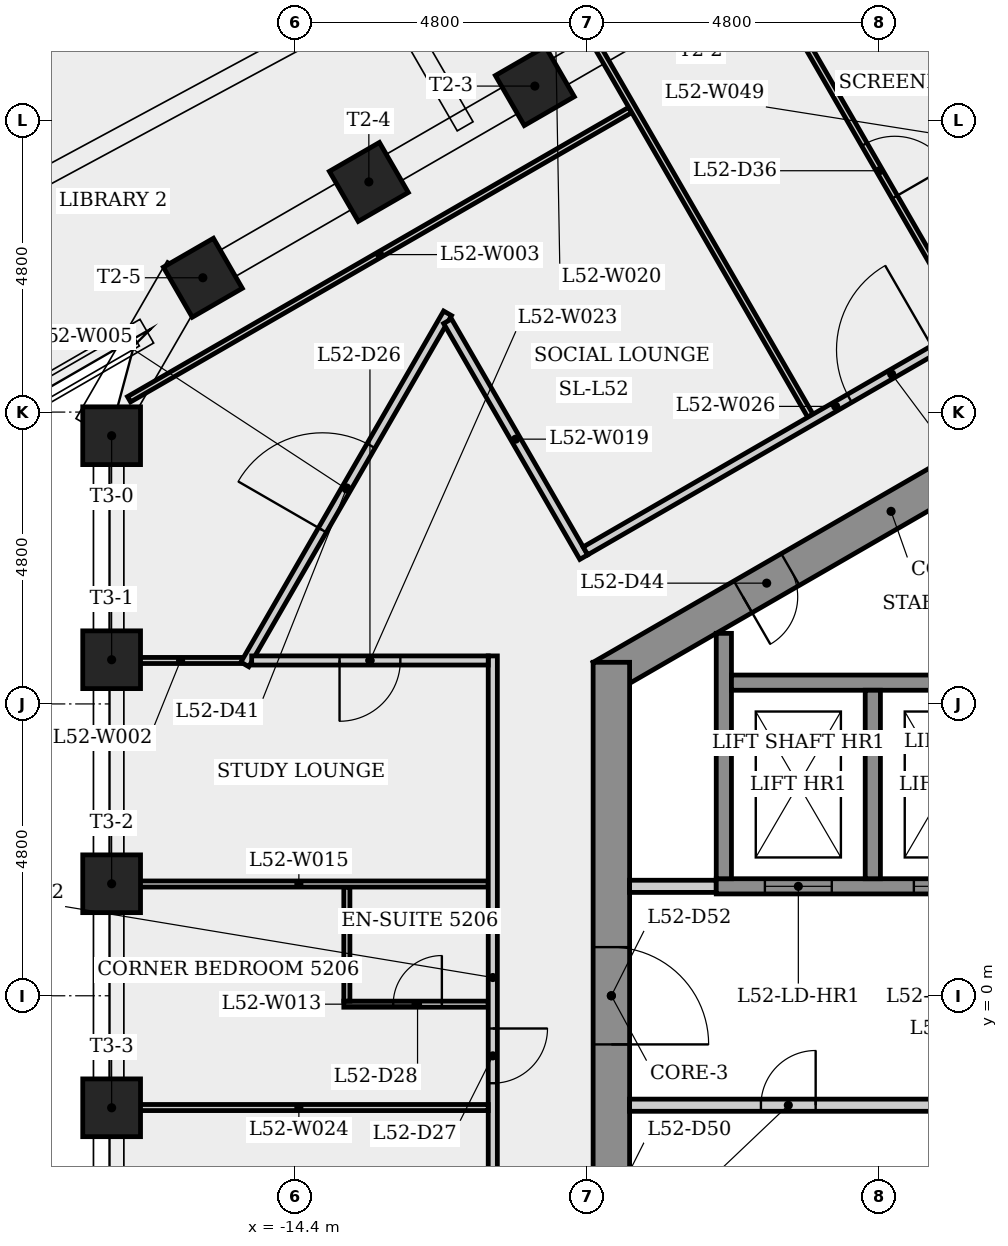
"""IFC4 building model, lengths in metres.
Left out: names, types, materials, properties, quantities, classifications, styles, units other than length and angle.
Written with IfcOpenShell. Run it as: python <this file> out.ifc"""

import sys

from ifc_helpers import new_model, si_unit, direction, frame, frame_2d, origin, origin_2d, place, context, subcontext, project, spatial, rectangle, extrude, element, fill, save


model = new_model("IFC4")
c1 = context("Model", 3, precision=1e-05, world=origin(), true_north=direction((0.0, 1.0)))
c2 = subcontext(c1, "Body", "Model", "MODEL_VIEW")
j1 = project(units=[si_unit("LENGTHUNIT", "METRE"), si_unit("PLANEANGLEUNIT", "RADIAN")], contexts=[c1])
p1 = place(None, origin())
s1 = spatial("IfcSite", under=j1, at=p1, CompositionType="ELEMENT")
p2 = place(p1, origin())
s2 = spatial("IfcBuilding", under=s1, at=p2, CompositionType="ELEMENT")
p3 = place(p2, frame((0.0, 0.0, 194.7)))
s3 = spatial("IfcBuildingStorey", under=s2, at=p3, CompositionType="ELEMENT", Elevation=194.7)
p4 = place(p3, frame((0.15, 10.71, 0.0), z_axis=(0.0, 0.0, 1.0), x_axis=(-0.866023993627, -0.500002442456, 0.0)))
e1 = element("IfcWall", 1, at=p4, inside=s3, PredefinedType="SHEAR", context=c2, shape_type="SweptSolid", body=[
    extrude(rectangle(XDim=10.97, YDim=0.6, at=frame_2d((5.485, 0.0))), origin(), (0.0, 0.0, 1.0), 4.0),
])
p5 = place(p4, frame((7.397, 0.0, 0.0)))
e2 = element("IfcOpeningElement", 2, at=p5, cuts=e1, PredefinedType="OPENING", context=c2, shape_type="SweptSolid", body=[
    extrude(rectangle(XDim=0.9, YDim=2.1, at=frame_2d((0.45, 1.05))), frame((0.0, 0.31, 0.0), z_axis=(0.0, -1.0, 0.0), x_axis=(1.0, 0.0, 0.0)), (0.0, 0.0, 1.0), 0.62),
])
p6 = place(p3, frame((-9.2, 5.485, 0.0), z_axis=(0.0, 0.0, 1.0), x_axis=(0.0, -1.0, 0.0)))
e3 = element("IfcWall", 3, at=p6, inside=s3, PredefinedType="SHEAR", context=c2, shape_type="SweptSolid", body=[
    extrude(rectangle(XDim=10.97, YDim=0.6, at=frame_2d((5.485, 0.0))), origin(), (0.0, 0.0, 1.0), 4.0),
])
p7 = place(p6, frame((8.516, 0.0, 0.0)))
e4 = element("IfcOpeningElement", 4, at=p7, cuts=e3, PredefinedType="OPENING", context=c2, shape_type="SweptSolid", body=[
    extrude(rectangle(XDim=0.9, YDim=2.1, at=frame_2d((0.45, 1.05))), frame((0.0, 0.31, 0.0), z_axis=(0.0, -1.0, 0.0), x_axis=(1.0, 0.0, 0.0)), (0.0, 0.0, 1.0), 0.62),
])
p8 = place(p6, frame((4.685, 0.0, 0.0)))
e5 = element("IfcOpeningElement", 5, at=p8, cuts=e3, PredefinedType="OPENING", context=c2, shape_type="SweptSolid", body=[
    extrude(rectangle(XDim=1.6, YDim=2.1, at=frame_2d((0.8, 1.05))), frame((0.0, 0.31, 0.0), z_axis=(0.0, -1.0, 0.0), x_axis=(1.0, 0.0, 0.0)), (0.0, 0.0, 1.0), 0.62),
])
for number, where, z_axis, x_axis in (
    (6, (-10.458, 14.962, 0.0), (0.0, 0.0, 1.0), (-0.5, 0.866, 0.0)),
    (7, (-13.188, 13.386, 0.0), (0.0, 0.0, 1.0), (-0.5, 0.866, 0.0)),
    (8, (-15.918, 11.809, 0.0), (0.0, 0.0, 1.0), (-0.5, 0.866, 0.0)),
    (9, (-17.418, 9.211, 0.0), (0.0, 0.0, 1.0), (-1.0, 0.0, 0.0)),
    (10, (-17.418, 5.527, 0.0), (0.0, 0.0, 1.0), (-1.0, 0.0, 0.0)),
    (11, (-17.418, 1.842, 0.0), (0.0, 0.0, 1.0), (-1.0, 0.0, 0.0)),
    (12, (-17.418, -1.842, 0.0), (0.0, 0.0, 1.0), (-1.0, 0.0, 0.0)),
):
    element("IfcColumn", number, at=place(p3, frame(where, z_axis=z_axis, x_axis=x_axis)), inside=s3, PredefinedType="COLUMN", context=c2, shape_type="SweptSolid", body=[
        extrude(rectangle(XDim=0.95, YDim=0.95, at=origin_2d()), origin(), (0.0, 0.0, 1.0), 4.0),
    ])
p9 = place(p3, frame((-26.639, 11.149, 0.0), z_axis=(0.0, 0.0, 1.0), x_axis=(0.866027084608, 0.499997088717, 0.0)))
e13 = element("IfcWall", 13, at=p9, inside=s3, PredefinedType="PARTITIONING", context=c2, shape_type="SweptSolid", body=[
    extrude(rectangle(XDim=17.083, YDim=0.1, at=frame_2d((8.542, 0.0))), origin(), (0.0, 0.0, 1.0), 3.65),
])
p10 = place(p3, frame((-17.303, 5.515, 0.0), z_axis=(0.0, 0.0, 1.0), x_axis=(1.0, 0.0, 0.0)))
e14 = element("IfcWall", 14, at=p10, inside=s3, PredefinedType="PARTITIONING", context=c2, shape_type="SweptSolid", body=[
    extrude(rectangle(XDim=2.038, YDim=0.1, at=frame_2d((1.019, 0.0))), origin(), (0.0, 0.0, 1.0), 3.65),
])
p11 = place(p3, frame((-17.132, 9.811, 0.0), z_axis=(0.0, 0.0, 1.0), x_axis=(0.866021566356, 0.500006646563, 0.0)))
e15 = element("IfcWall", 15, at=p11, inside=s3, PredefinedType="PARTITIONING", context=c2, shape_type="SweptSolid", body=[
    extrude(rectangle(XDim=9.518, YDim=0.1, at=frame_2d((4.759, 0.0))), origin(), (0.0, 0.0, 1.0), 3.65),
])
p12 = place(p3, frame((-15.228, 5.45, 0.0), z_axis=(0.0, 0.0, 1.0), x_axis=(0.499982336103, 0.8660356018, 0.0)))
e16 = element("IfcWall", 16, at=p12, inside=s3, PredefinedType="PARTITIONING", context=c2, shape_type="SweptSolid", body=[
    extrude(rectangle(XDim=6.668, YDim=0.15, at=frame_2d((3.334, 0.0))), origin(), (0.0, 0.0, 1.0), 3.65),
])
p13 = place(p12, frame((2.552, 0.0, 0.0)))
e17 = element("IfcOpeningElement", 17, at=p13, cuts=e16, PredefinedType="OPENING", context=c2, shape_type="SweptSolid", body=[
    extrude(rectangle(XDim=1.6, YDim=2.1, at=frame_2d((0.8, 1.05))), frame((0.0, 0.085, 0.0), z_axis=(0.0, -1.0, 0.0), x_axis=(1.0, 0.0, 0.0)), (0.0, 0.0, 1.0), 0.17),
])
p14 = place(p3, frame((-14.708, 30.748, 0.0), z_axis=(0.0, 0.0, 1.0), x_axis=(0.499993923875, -0.866028911808, 0.0)))
e18 = element("IfcWall", 18, at=p14, inside=s3, PredefinedType="PARTITIONING", context=c2, shape_type="SweptSolid", body=[
    extrude(rectangle(XDim=22.758, YDim=0.1, at=frame_2d((11.379, 0.0))), origin(), (0.0, 0.0, 1.0), 3.65),
])
p15 = place(p14, frame((1.731, 0.0, 0.0)))
e19 = element("IfcOpeningElement", 19, at=p15, cuts=e18, PredefinedType="OPENING", context=c2, shape_type="SweptSolid", body=[
    extrude(rectangle(XDim=1.6, YDim=2.1, at=frame_2d((0.8, 1.05))), frame((0.0, 0.06, 0.0), z_axis=(0.0, -1.0, 0.0), x_axis=(1.0, 0.0, 0.0)), (0.0, 0.0, 1.0), 0.12),
])
p16 = place(p14, frame((19.336, 0.0, 0.0)))
e20 = element("IfcOpeningElement", 20, at=p16, cuts=e18, PredefinedType="OPENING", context=c2, shape_type="SweptSolid", body=[
    extrude(rectangle(XDim=1.0, YDim=2.1, at=frame_2d((0.5, 1.05))), frame((0.0, 0.06, 0.0), z_axis=(0.0, -1.0, 0.0), x_axis=(1.0, 0.0, 0.0)), (0.0, 0.0, 1.0), 0.12),
])
p17 = place(p14, frame((13.667, 0.0, 0.0)))
e21 = element("IfcOpeningElement", 21, at=p17, cuts=e18, PredefinedType="OPENING", context=c2, shape_type="SweptSolid", body=[
    extrude(rectangle(XDim=1.6, YDim=2.1, at=frame_2d((0.8, 1.05))), frame((0.0, 0.06, 0.0), z_axis=(0.0, -1.0, 0.0), x_axis=(1.0, 0.0, 0.0)), (0.0, 0.0, 1.0), 0.12),
])
p18 = place(p14, frame((9.746, 0.0, 0.0)))
e22 = element("IfcOpeningElement", 22, at=p18, cuts=e18, PredefinedType="OPENING", context=c2, shape_type="SweptSolid", body=[
    extrude(rectangle(XDim=1.6, YDim=2.1, at=frame_2d((0.8, 1.05))), frame((0.0, 0.06, 0.0), z_axis=(0.0, -1.0, 0.0), x_axis=(1.0, 0.0, 0.0)), (0.0, 0.0, 1.0), 0.12),
])
p19 = place(p14, frame((7.041, 0.0, 0.0)))
e23 = element("IfcOpeningElement", 23, at=p19, cuts=e18, PredefinedType="OPENING", context=c2, shape_type="SweptSolid", body=[
    extrude(rectangle(XDim=1.0, YDim=2.1, at=frame_2d((0.5, 1.05))), frame((0.0, 0.06, 0.0), z_axis=(0.0, -1.0, 0.0), x_axis=(1.0, 0.0, 0.0)), (0.0, 0.0, 1.0), 0.12),
])
p20 = place(p3, frame((-13.6, -0.138, 0.0), z_axis=(0.0, 0.0, 1.0), x_axis=(1.0, 0.0, 0.0)))
e24 = element("IfcWall", 24, at=p20, inside=s3, PredefinedType="PARTITIONING", context=c2, shape_type="SweptSolid", body=[
    extrude(rectangle(XDim=2.375, YDim=0.1, at=frame_2d((1.188, 0.0))), origin(), (0.0, 0.0, 1.0), 3.65),
])
p21 = place(p20, frame((0.812, 0.0, 0.0)))
e25 = element("IfcOpeningElement", 25, at=p21, cuts=e24, PredefinedType="OPENING", context=c2, shape_type="SweptSolid", body=[
    extrude(rectangle(XDim=0.8, YDim=2.1, at=frame_2d((0.4, 1.05))), frame((0.0, 0.06, 0.0), z_axis=(0.0, -1.0, 0.0), x_axis=(1.0, 0.0, 0.0)), (0.0, 0.0, 1.0), 0.12),
])
p22 = place(p3, frame((-13.55, 1.788, 0.0), z_axis=(0.0, 0.0, 1.0), x_axis=(0.0, -1.0, 0.0)))
e26 = element("IfcWall", 26, at=p22, inside=s3, PredefinedType="PARTITIONING", context=c2, shape_type="SweptSolid", body=[
    extrude(rectangle(XDim=1.876, YDim=0.1, at=frame_2d((0.938, 0.0))), origin(), (0.0, 0.0, 1.0), 3.65),
])
p23 = place(p3, frame((-17.453, 1.838, 0.0), z_axis=(0.0, 0.0, 1.0), x_axis=(1.0, 0.0, 0.0)))
e27 = element("IfcWall", 27, at=p23, inside=s3, PredefinedType="PARTITIONING", context=c2, shape_type="SweptSolid", body=[
    extrude(rectangle(XDim=6.228, YDim=0.1, at=frame_2d((3.114, 0.0))), origin(), (0.0, 0.0, 1.0), 3.65),
])
p24 = place(p3, frame((-11.894, 11.095, 0.0), z_axis=(0.0, 0.0, 1.0), x_axis=(0.500030632641, -0.866007717299, 0.0)))
e28 = element("IfcWall", 28, at=p24, inside=s3, PredefinedType="PARTITIONING", context=c2, shape_type="SweptSolid", body=[
    extrude(rectangle(XDim=4.48, YDim=0.15, at=frame_2d((2.24, 0.0))), origin(), (0.0, 0.0, 1.0), 3.65),
])
p25 = place(p3, frame((-14.342, 24.115, 0.0), z_axis=(0.0, 0.0, 1.0), x_axis=(0.500000372387, -0.866025188786, 0.0)))
e29 = element("IfcWall", 29, at=p25, inside=s3, PredefinedType="PARTITIONING", context=c2, shape_type="SweptSolid", body=[
    extrude(rectangle(XDim=16.831, YDim=0.1, at=frame_2d((8.415, 0.0))), origin(), (0.0, 0.0, 1.0), 3.65),
])
p26 = place(p25, frame((7.237, 0.0, 0.0)))
e30 = element("IfcOpeningElement", 30, at=p26, cuts=e29, PredefinedType="OPENING", context=c2, shape_type="SweptSolid", body=[
    extrude(rectangle(XDim=1.6, YDim=2.1, at=frame_2d((0.8, 1.05))), frame((0.0, 0.06, 0.0), z_axis=(0.0, -1.0, 0.0), x_axis=(1.0, 0.0, 0.0)), (0.0, 0.0, 1.0), 0.12),
])
p27 = place(p3, frame((-11.15, 5.59, 0.0), z_axis=(0.0, 0.0, 1.0), x_axis=(0.0, -1.0, 0.0)))
e31 = element("IfcWall", 31, at=p27, inside=s3, PredefinedType="PARTITIONING", context=c2, shape_type="SweptSolid", body=[
    extrude(rectangle(XDim=10.579, YDim=0.15, at=frame_2d((5.29, 0.0))), origin(), (0.0, 0.0, 1.0), 3.65),
])
p28 = place(p27, frame((6.128, 0.0, 0.0)))
e32 = element("IfcOpeningElement", 32, at=p28, cuts=e31, PredefinedType="OPENING", context=c2, shape_type="SweptSolid", body=[
    extrude(rectangle(XDim=0.9, YDim=2.1, at=frame_2d((0.45, 1.05))), frame((0.0, 0.085, 0.0), z_axis=(0.0, -1.0, 0.0), x_axis=(1.0, 0.0, 0.0)), (0.0, 0.0, 1.0), 0.17),
])
p29 = place(p27, frame((8.519, 0.0, 0.0)))
e33 = element("IfcOpeningElement", 33, at=p29, cuts=e31, PredefinedType="OPENING", context=c2, shape_type="SweptSolid", body=[
    extrude(rectangle(XDim=1.0, YDim=2.1, at=frame_2d((0.5, 1.05))), frame((0.0, 0.085, 0.0), z_axis=(0.0, -1.0, 0.0), x_axis=(1.0, 0.0, 0.0)), (0.0, 0.0, 1.0), 0.17),
])
p30 = place(p3, frame((-11.225, 5.515, 0.0), z_axis=(0.0, 0.0, 1.0), x_axis=(-1.0, 0.0, 0.0)))
e34 = element("IfcWall", 34, at=p30, inside=s3, PredefinedType="PARTITIONING", context=c2, shape_type="SweptSolid", body=[
    extrude(rectangle(XDim=3.89, YDim=0.15, at=frame_2d((1.945, 0.0))), origin(), (0.0, 0.0, 1.0), 3.65),
])
p31 = place(p30, frame((1.445, 0.0, 0.0)))
e35 = element("IfcOpeningElement", 35, at=p31, cuts=e34, PredefinedType="OPENING", context=c2, shape_type="SweptSolid", body=[
    extrude(rectangle(XDim=1.0, YDim=2.1, at=frame_2d((0.5, 1.05))), frame((0.0, 0.085, 0.0), z_axis=(0.0, -1.0, 0.0), x_axis=(1.0, 0.0, 0.0)), (0.0, 0.0, 1.0), 0.17),
])
p32 = place(p3, frame((-11.225, -1.838, 0.0), z_axis=(0.0, 0.0, 1.0), x_axis=(-1.0, 0.0, 0.0)))
e36 = element("IfcWall", 36, at=p32, inside=s3, PredefinedType="PARTITIONING", context=c2, shape_type="SweptSolid", body=[
    extrude(rectangle(XDim=6.228, YDim=0.1, at=frame_2d((3.114, 0.0))), origin(), (0.0, 0.0, 1.0), 3.65),
])
p33 = place(p3, frame((-9.626, 7.317, 0.0), z_axis=(0.0, 0.0, 1.0), x_axis=(0.866032896488, 0.499987022033, 0.0)))
e37 = element("IfcWall", 37, at=p33, inside=s3, PredefinedType="PARTITIONING", context=c2, shape_type="SweptSolid", body=[
    extrude(rectangle(XDim=9.506, YDim=0.15, at=frame_2d((4.753, 0.0))), origin(), (0.0, 0.0, 1.0), 3.65),
])
p34 = place(p33, frame((5.015, 0.0, 0.0)))
e38 = element("IfcOpeningElement", 38, at=p34, cuts=e37, PredefinedType="OPENING", context=c2, shape_type="SweptSolid", body=[
    extrude(rectangle(XDim=1.6, YDim=2.1, at=frame_2d((0.8, 1.05))), frame((0.0, 0.085, 0.0), z_axis=(0.0, -1.0, 0.0), x_axis=(1.0, 0.0, 0.0)), (0.0, 0.0, 1.0), 0.17),
])
p35 = place(p3, frame((-8.9, 1.8, 0.0), z_axis=(0.0, 0.0, 1.0), x_axis=(1.0, 0.0, 0.0)))
e39 = element("IfcWall", 39, at=p35, inside=s3, PredefinedType="PARTITIONING", context=c2, shape_type="SweptSolid", body=[
    extrude(rectangle(XDim=1.425, YDim=0.2, at=frame_2d((0.712, 0.0))), origin(), (0.0, 0.0, 1.0), 3.65),
])
p36 = place(p3, frame((-7.475, 1.8, 0.0), z_axis=(0.0, 0.0, 1.0), x_axis=(1.0, 0.0, 0.0)))
e40 = element("IfcWall", 40, at=p36, inside=s3, PredefinedType="SHEAR", context=c2, shape_type="SweptSolid", body=[
    extrude(rectangle(XDim=14.95, YDim=0.25, at=frame_2d((7.475, 0.0))), origin(), (0.0, 0.0, 1.0), 3.65),
])
p37 = place(p36, frame((0.8, 0.0, 0.0)))
e41 = element("IfcOpeningElement", 41, at=p37, cuts=e40, PredefinedType="OPENING", context=c2, shape_type="SweptSolid", body=[
    extrude(rectangle(XDim=1.1, YDim=2.1, at=frame_2d((0.55, 1.05))), frame((0.0, 0.135, 0.0), z_axis=(0.0, -1.0, 0.0), x_axis=(1.0, 0.0, 0.0)), (0.0, 0.0, 1.0), 0.27),
])
p38 = place(p36, frame((3.25, 0.0, 0.0)))
e42 = element("IfcOpeningElement", 42, at=p38, cuts=e40, PredefinedType="OPENING", context=c2, shape_type="SweptSolid", body=[
    extrude(rectangle(XDim=1.1, YDim=2.1, at=frame_2d((0.55, 1.05))), frame((0.0, 0.135, 0.0), z_axis=(0.0, -1.0, 0.0), x_axis=(1.0, 0.0, 0.0)), (0.0, 0.0, 1.0), 0.27),
])
p39 = place(p36, frame((5.7, 0.0, 0.0)))
e43 = element("IfcOpeningElement", 43, at=p39, cuts=e40, PredefinedType="OPENING", context=c2, shape_type="SweptSolid", body=[
    extrude(rectangle(XDim=1.1, YDim=2.1, at=frame_2d((0.55, 1.05))), frame((0.0, 0.135, 0.0), z_axis=(0.0, -1.0, 0.0), x_axis=(1.0, 0.0, 0.0)), (0.0, 0.0, 1.0), 0.27),
])
p40 = place(p36, frame((8.15, 0.0, 0.0)))
e44 = element("IfcOpeningElement", 44, at=p40, cuts=e40, PredefinedType="OPENING", context=c2, shape_type="SweptSolid", body=[
    extrude(rectangle(XDim=1.1, YDim=2.1, at=frame_2d((0.55, 1.05))), frame((0.0, 0.135, 0.0), z_axis=(0.0, -1.0, 0.0), x_axis=(1.0, 0.0, 0.0)), (0.0, 0.0, 1.0), 0.27),
])
p41 = place(p36, frame((10.6, 0.0, 0.0)))
e45 = element("IfcOpeningElement", 45, at=p41, cuts=e40, PredefinedType="OPENING", context=c2, shape_type="SweptSolid", body=[
    extrude(rectangle(XDim=1.1, YDim=2.1, at=frame_2d((0.55, 1.05))), frame((0.0, 0.135, 0.0), z_axis=(0.0, -1.0, 0.0), x_axis=(1.0, 0.0, 0.0)), (0.0, 0.0, 1.0), 0.27),
])
p42 = place(p36, frame((13.05, 0.0, 0.0)))
e46 = element("IfcOpeningElement", 46, at=p42, cuts=e40, PredefinedType="OPENING", context=c2, shape_type="SweptSolid", body=[
    extrude(rectangle(XDim=1.1, YDim=2.1, at=frame_2d((0.55, 1.05))), frame((0.0, 0.135, 0.0), z_axis=(0.0, -1.0, 0.0), x_axis=(1.0, 0.0, 0.0)), (0.0, 0.0, 1.0), 0.27),
])
p43 = place(p3, frame((-7.35, 1.925, 0.0), z_axis=(0.0, 0.0, 1.0), x_axis=(0.0, 1.0, 0.0)))
e47 = element("IfcWall", 47, at=p43, inside=s3, PredefinedType="SHEAR", context=c2, shape_type="SweptSolid", body=[
    extrude(rectangle(XDim=4.036, YDim=0.25, at=frame_2d((2.018, 0.0))), origin(), (0.0, 0.0, 1.0), 3.65),
])
p44 = place(p3, frame((-7.225, 5.15, 0.0), z_axis=(0.0, 0.0, 1.0), x_axis=(1.0, 0.0, 0.0)))
e48 = element("IfcWall", 48, at=p44, inside=s3, PredefinedType="SHEAR", context=c2, shape_type="SweptSolid", body=[
    extrude(rectangle(XDim=14.7, YDim=0.25, at=frame_2d((7.35, 0.0))), origin(), (0.0, 0.0, 1.0), 3.65),
])
p45 = place(p3, frame((-4.9, 5.025, 0.0), z_axis=(0.0, 0.0, 1.0), x_axis=(0.0, -1.0, 0.0)))
e49 = element("IfcWall", 49, at=p45, inside=s3, PredefinedType="SHEAR", context=c2, shape_type="SweptSolid", body=[
    extrude(rectangle(XDim=3.1, YDim=0.25, at=frame_2d((1.55, 0.0))), origin(), (0.0, 0.0, 1.0), 4.0),
])
p46 = place(p3, frame((-8.9, -1.8, 0.0), z_axis=(0.0, 0.0, 1.0), x_axis=(1.0, 0.0, 0.0)))
e50 = element("IfcWall", 50, at=p46, inside=s3, PredefinedType="PARTITIONING", context=c2, shape_type="SweptSolid", body=[
    extrude(rectangle(XDim=11.225, YDim=0.2, at=frame_2d((5.613, 0.0))), origin(), (0.0, 0.0, 1.0), 3.65),
])
p47 = place(p46, frame((2.16, 0.0, 0.0)))
e51 = element("IfcOpeningElement", 51, at=p47, cuts=e50, PredefinedType="OPENING", context=c2, shape_type="SweptSolid", body=[
    extrude(rectangle(XDim=0.9, YDim=2.1, at=frame_2d((0.45, 1.05))), frame((0.0, 0.11, 0.0), z_axis=(0.0, -1.0, 0.0), x_axis=(1.0, 0.0, 0.0)), (0.0, 0.0, 1.0), 0.22),
])
p48 = place(p46, frame((6.61, 0.0, 0.0)))
e52 = element("IfcOpeningElement", 52, at=p48, cuts=e50, PredefinedType="OPENING", context=c2, shape_type="SweptSolid", body=[
    extrude(rectangle(XDim=0.9, YDim=2.1, at=frame_2d((0.45, 1.05))), frame((0.0, 0.11, 0.0), z_axis=(0.0, -1.0, 0.0), x_axis=(1.0, 0.0, 0.0)), (0.0, 0.0, 1.0), 0.22),
])
p49 = place(p46, frame((9.613, 0.0, 0.0)))
e53 = element("IfcOpeningElement", 53, at=p49, cuts=e50, PredefinedType="OPENING", context=c2, shape_type="SweptSolid", body=[
    extrude(rectangle(XDim=0.9, YDim=2.1, at=frame_2d((0.45, 1.05))), frame((0.0, 0.11, 0.0), z_axis=(0.0, -1.0, 0.0), x_axis=(1.0, 0.0, 0.0)), (0.0, 0.0, 1.0), 0.22),
])
p50 = place(p37, origin())
e54 = element("IfcDoor", 54, at=p50, inside=s3, OperationType="SLIDING_TO_LEFT", PredefinedType="DOOR", context=c2, shape_type="SweptSolid", body=[
    extrude(rectangle(XDim=1.1, YDim=2.1, at=frame_2d((0.55, 1.05))), frame((0.0, 0.025, 0.0), z_axis=(0.0, -1.0, 0.0), x_axis=(1.0, 0.0, 0.0)), (0.0, 0.0, 1.0), 0.05),
])
fill(e41, e54)
p51 = place(p38, origin())
e55 = element("IfcDoor", 55, at=p51, inside=s3, OperationType="SLIDING_TO_LEFT", PredefinedType="DOOR", context=c2, shape_type="SweptSolid", body=[
    extrude(rectangle(XDim=1.1, YDim=2.1, at=frame_2d((0.55, 1.05))), frame((0.0, 0.025, 0.0), z_axis=(0.0, -1.0, 0.0), x_axis=(1.0, 0.0, 0.0)), (0.0, 0.0, 1.0), 0.05),
])
fill(e42, e55)
p52 = place(p47, origin())
e56 = element("IfcDoor", 56, at=p52, inside=s3, OperationType="SINGLE_SWING_RIGHT", PredefinedType="DOOR", context=c2, shape_type="SweptSolid", body=[
    extrude(rectangle(XDim=0.9, YDim=2.1, at=frame_2d((0.45, 1.05))), frame((0.0, 0.025, 0.0), z_axis=(0.0, -1.0, 0.0), x_axis=(1.0, 0.0, 0.0)), (0.0, 0.0, 1.0), 0.05),
])
fill(e51, e56)
p53 = place(p31, origin())
e57 = element("IfcDoor", 57, at=p53, inside=s3, OperationType="SINGLE_SWING_RIGHT", PredefinedType="DOOR", context=c2, shape_type="SweptSolid", body=[
    extrude(rectangle(XDim=1.0, YDim=2.1, at=frame_2d((0.5, 1.05))), frame((0.0, 0.025, 0.0), z_axis=(0.0, -1.0, 0.0), x_axis=(1.0, 0.0, 0.0)), (0.0, 0.0, 1.0), 0.05),
])
fill(e35, e57)
p54 = place(p28, origin())
e58 = element("IfcDoor", 58, at=p54, inside=s3, OperationType="SINGLE_SWING_LEFT", PredefinedType="DOOR", context=c2, shape_type="SweptSolid", body=[
    extrude(rectangle(XDim=0.9, YDim=2.1, at=frame_2d((0.45, 1.05))), frame((0.0, 0.025, 0.0), z_axis=(0.0, -1.0, 0.0), x_axis=(1.0, 0.0, 0.0)), (0.0, 0.0, 1.0), 0.05),
])
fill(e32, e58)
p55 = place(p21, origin())
e59 = element("IfcDoor", 59, at=p55, inside=s3, OperationType="SINGLE_SWING_RIGHT", PredefinedType="DOOR", context=c2, shape_type="SweptSolid", body=[
    extrude(rectangle(XDim=0.8, YDim=2.1, at=frame_2d((0.4, 1.05))), frame((0.0, 0.025, 0.0), z_axis=(0.0, -1.0, 0.0), x_axis=(1.0, 0.0, 0.0)), (0.0, 0.0, 1.0), 0.05),
])
fill(e25, e59)
p56 = place(p34, origin())
e60 = element("IfcDoor", 60, at=p56, inside=s3, OperationType="SINGLE_SWING_RIGHT", PredefinedType="DOOR", context=c2, shape_type="SweptSolid", body=[
    extrude(rectangle(XDim=1.6, YDim=2.1, at=frame_2d((0.8, 1.05))), frame((0.0, 0.025, 0.0), z_axis=(0.0, -1.0, 0.0), x_axis=(1.0, 0.0, 0.0)), (0.0, 0.0, 1.0), 0.05),
])
fill(e38, e60)
p57 = place(p16, origin())
e61 = element("IfcDoor", 61, at=p57, inside=s3, OperationType="SINGLE_SWING_RIGHT", PredefinedType="DOOR", context=c2, shape_type="SweptSolid", body=[
    extrude(rectangle(XDim=1.0, YDim=2.1, at=frame_2d((0.5, 1.05))), frame((0.0, 0.025, 0.0), z_axis=(0.0, -1.0, 0.0), x_axis=(1.0, 0.0, 0.0)), (0.0, 0.0, 1.0), 0.05),
])
fill(e20, e61)
p58 = place(p13, origin())
e62 = element("IfcDoor", 62, at=p58, inside=s3, OperationType="SINGLE_SWING_LEFT", PredefinedType="DOOR", context=c2, shape_type="SweptSolid", body=[
    extrude(rectangle(XDim=1.6, YDim=2.1, at=frame_2d((0.8, 1.05))), frame((0.0, 0.025, 0.0), z_axis=(0.0, -1.0, 0.0), x_axis=(1.0, 0.0, 0.0)), (0.0, 0.0, 1.0), 0.05),
])
fill(e17, e62)
p59 = place(p5, origin())
e63 = element("IfcDoor", 63, at=p59, inside=s3, OperationType="SINGLE_SWING_RIGHT", PredefinedType="DOOR", context=c2, shape_type="SweptSolid", body=[
    extrude(rectangle(XDim=0.9, YDim=2.1, at=frame_2d((0.45, 1.05))), frame((0.0, 0.025, 0.0), z_axis=(0.0, -1.0, 0.0), x_axis=(1.0, 0.0, 0.0)), (0.0, 0.0, 1.0), 0.05),
])
fill(e2, e63)
p60 = place(p8, origin())
e64 = element("IfcDoor", 64, at=p60, inside=s3, OperationType="SINGLE_SWING_RIGHT", PredefinedType="DOOR", context=c2, shape_type="SweptSolid", body=[
    extrude(rectangle(XDim=1.6, YDim=2.1, at=frame_2d((0.8, 1.05))), frame((0.0, 0.025, 0.0), z_axis=(0.0, -1.0, 0.0), x_axis=(1.0, 0.0, 0.0)), (0.0, 0.0, 1.0), 0.05),
])
fill(e5, e64)
save(model, sys.argv[1])
